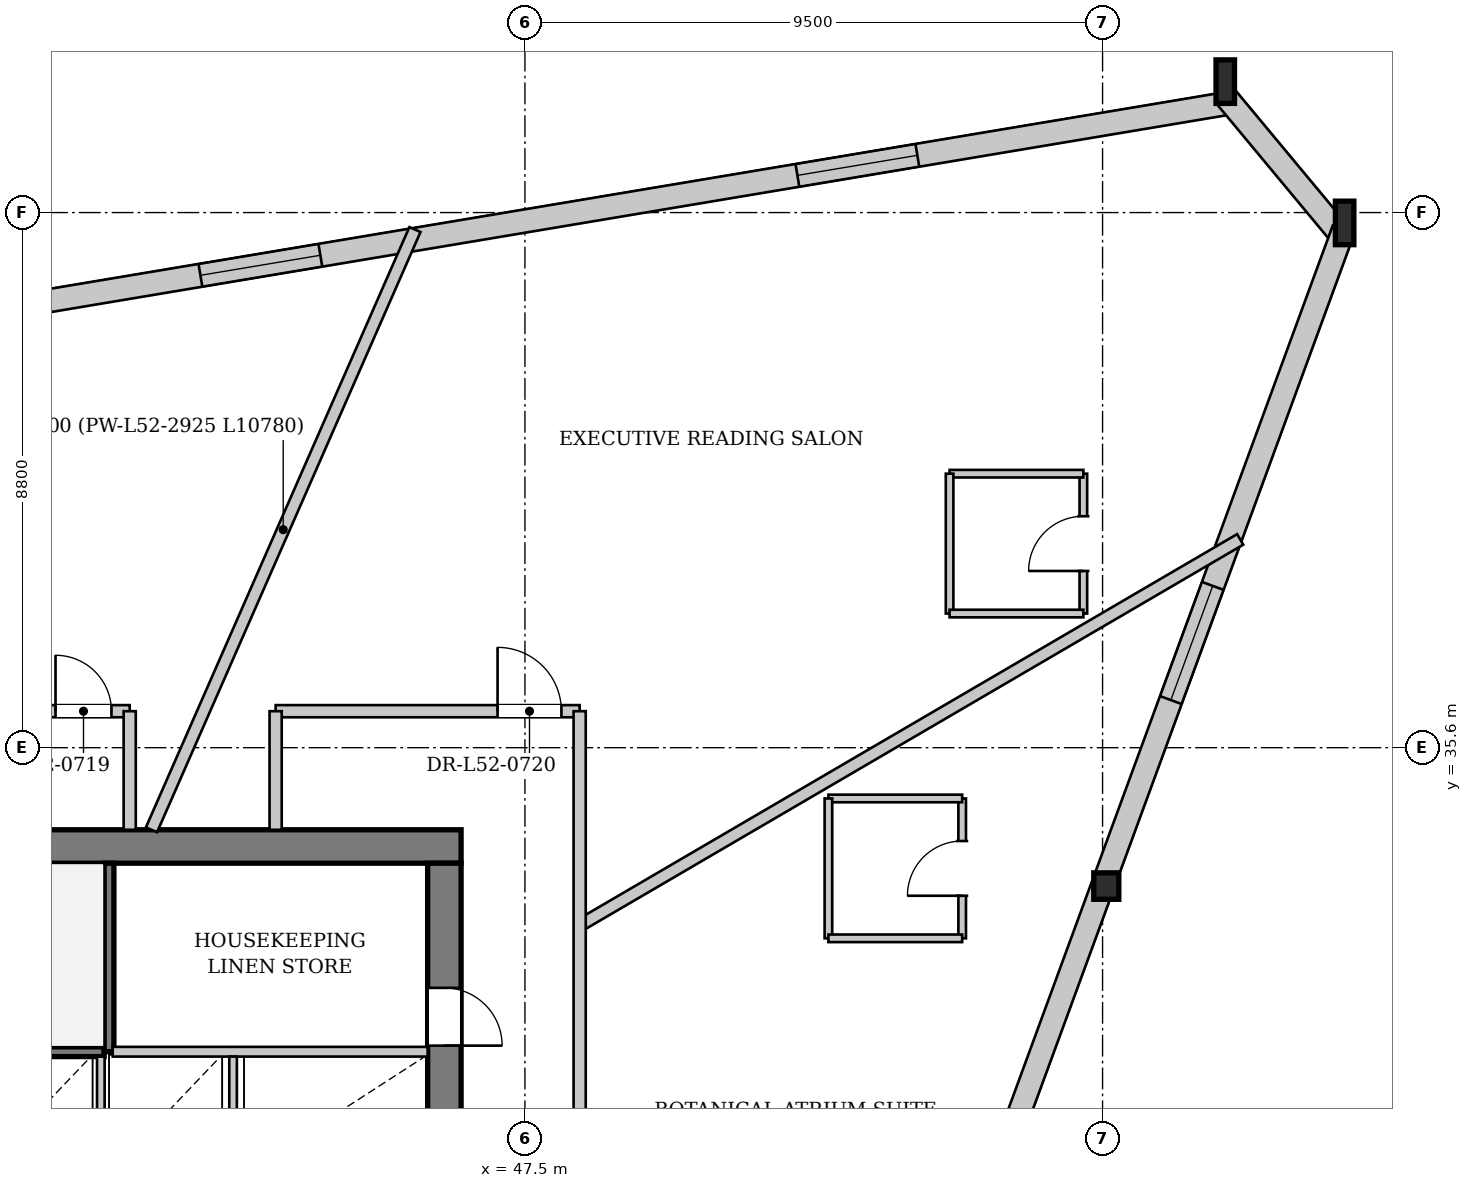
"""IFC4 building model, lengths in metres.
Left out: names, types, materials, properties, quantities, classifications, styles, units other than length and angle.
Written with IfcOpenShell. Run it as: python <this file> out.ifc"""

import sys

from ifc_helpers import new_model, si_unit, direction, frame, frame_2d, origin, origin_2d, place, context, subcontext, project, spatial, rectangle, i_section, extrude, source, transform, mapped, element, fill, save


model = new_model("IFC4")
c1 = context("Model", 3, precision=1e-05, world=origin(), true_north=direction((0.0, 1.0)))
c2 = subcontext(c1, "Body", "Model", "MODEL_VIEW")
j1 = project(units=[si_unit("LENGTHUNIT", "METRE"), si_unit("PLANEANGLEUNIT", "RADIAN")], contexts=[c1])
p1 = place(None, origin())
s1 = spatial("IfcSite", under=j1, at=p1, CompositionType="ELEMENT")
p2 = place(p1, origin())
s2 = spatial("IfcBuilding", under=s1, at=p2, CompositionType="ELEMENT")
p3 = place(p2, frame((0.0, 0.0, 196.3)))
s3 = spatial("IfcBuildingStorey", under=s2, at=p3, CompositionType="ELEMENT", Elevation=196.3)
m1 = source(origin(), c2, "Body", "SweptSolid", [
    extrude(i_section(OverallWidth=0.304, OverallDepth=0.716, WebThickness=0.021, FlangeThickness=0.04, at=origin_2d()), origin(), (0.0, 0.0, 1.0), 3.864),
])
p4 = place(p3, frame((61.142, 44.056, 0.0), z_axis=(-0.083525770677, 0.089780726273, 0.992452954463), x_axis=(-0.732150884226, -0.681142483425, 0.0)))
e1 = element("IfcColumn", 1, at=p4, inside=s3, PredefinedType="COLUMN", context=c2, shape_type="MappedRepresentation", body=[
    mapped(m1, transform((0.0, 0.0, 0.0), x_axis=(1.0, 0.0, 0.0), y_axis=(0.0, 1.0, 0.0), z_axis=(0.0, 0.0, 1.0), scale=1.0)),
])
m2 = source(origin(), c2, "Body", "SweptSolid", [
    extrude(i_section(OverallWidth=0.304, OverallDepth=0.716, WebThickness=0.021, FlangeThickness=0.04, at=origin_2d()), origin(), (0.0, 0.0, 1.0), 3.86),
])
p5 = place(p3, frame((59.185, 46.41, 0.0), z_axis=(-0.086647024818, 0.074250808128, 0.993468223237), x_axis=(-0.650700079032, -0.759334845208, 0.0)))
e2 = element("IfcColumn", 2, at=p5, inside=s3, PredefinedType="COLUMN", context=c2, shape_type="MappedRepresentation", body=[
    mapped(m2, transform((0.0, 0.0, 0.0), x_axis=(1.0, 0.0, 0.0), y_axis=(0.0, 1.0, 0.0), z_axis=(0.0, 0.0, 1.0), scale=1.0)),
])
m3 = source(origin(), c2, "Body", "SweptSolid", [
    extrude(i_section(OverallWidth=0.412, OverallDepth=0.435, WebThickness=0.031, FlangeThickness=0.05, at=origin_2d()), origin(), (0.0, 0.0, 1.0), 3.851),
])
p6 = place(p3, frame((57.146, 33.17, 0.0), z_axis=(-0.043744108522, 0.079880545996, 0.995844140085), x_axis=(-0.877096267842, -0.480314622866, 0.0)))
e3 = element("IfcColumn", 3, at=p6, inside=s3, PredefinedType="COLUMN", context=c2, shape_type="MappedRepresentation", body=[
    mapped(m3, transform((0.0, 0.0, 0.0), x_axis=(1.0, 0.0, 0.0), y_axis=(0.0, 1.0, 0.0), z_axis=(0.0, 0.0, 1.0), scale=1.0)),
])
p7 = place(p3, frame((36.9, 42.487, 0.0), z_axis=(0.0, 0.0, 1.0), x_axis=(0.986277614339, 0.165095328385, 0.0)))
e4 = element("IfcWall", 4, at=p7, inside=s3, PredefinedType="SOLIDWALL", context=c2, shape_type="SweptSolid", body=[
    extrude(rectangle(XDim=22.627, YDim=0.38, at=frame_2d((11.313, 0.0))), origin(), (0.0, 0.0, 1.0), 3.172),
])
p8 = place(p7, frame((5.336, 0.0, 0.252)))
e5 = element("IfcOpeningElement", 5, at=p8, cuts=e4, PredefinedType="OPENING", context=c2, shape_type="SweptSolid", body=[
    extrude(rectangle(XDim=2.0, YDim=2.8, at=frame_2d((1.0, 1.4))), frame((0.0, 0.2, 0.0), z_axis=(0.0, -1.0, 0.0), x_axis=(1.0, 0.0, 0.0)), (0.0, 0.0, 1.0), 0.4),
])
p9 = place(p7, frame((15.291, 0.0, 0.252)))
e6 = element("IfcOpeningElement", 6, at=p9, cuts=e4, PredefinedType="OPENING", context=c2, shape_type="SweptSolid", body=[
    extrude(rectangle(XDim=2.0, YDim=2.8, at=frame_2d((1.0, 1.4))), frame((0.0, 0.2, 0.0), z_axis=(0.0, -1.0, 0.0), x_axis=(1.0, 0.0, 0.0)), (0.0, 0.0, 1.0), 0.4),
])
p10 = place(p3, frame((59.039, 46.288, 0.0), z_axis=(0.0, 0.0, 1.0), x_axis=(0.639415269813, -0.76886156929, 0.0)))
e7 = element("IfcWall", 7, at=p10, inside=s3, PredefinedType="SOLIDWALL", context=c2, shape_type="SweptSolid", body=[
    extrude(rectangle(XDim=3.061, YDim=0.38, at=frame_2d((1.531, 0.0))), origin(), (0.0, 0.0, 1.0), 3.172),
])
p11 = place(p3, frame((60.964, 44.122, 0.0), z_axis=(0.0, 0.0, 1.0), x_axis=(-0.344663194366, -0.938726415123, 0.0)))
e8 = element("IfcWall", 8, at=p11, inside=s3, PredefinedType="SOLIDWALL", context=c2, shape_type="SweptSolid", body=[
    extrude(rectangle(XDim=23.193, YDim=0.38, at=frame_2d((11.597, 0.0))), origin(), (0.0, 0.0, 1.0), 3.172),
])
p12 = place(p11, frame((6.244, 0.0, 0.252)))
e9 = element("IfcOpeningElement", 9, at=p12, cuts=e8, PredefinedType="OPENING", context=c2, shape_type="SweptSolid", body=[
    extrude(rectangle(XDim=2.0, YDim=2.8, at=frame_2d((1.0, 1.4))), frame((0.0, 0.2, 0.0), z_axis=(0.0, -1.0, 0.0), x_axis=(1.0, 0.0, 0.0)), (0.0, 0.0, 1.0), 0.4),
])
p13 = place(p11, frame((15.699, 0.0, 0.252)))
e10 = element("IfcOpeningElement", 10, at=p13, cuts=e8, PredefinedType="OPENING", context=c2, shape_type="SweptSolid", body=[
    extrude(rectangle(XDim=2.0, YDim=2.8, at=frame_2d((1.0, 1.4))), frame((0.0, 0.2, 0.0), z_axis=(0.0, -1.0, 0.0), x_axis=(1.0, 0.0, 0.0)), (0.0, 0.0, 1.0), 0.4),
])
p14 = place(p3, frame((29.55, 33.975, 0.0), z_axis=(0.0, 0.0, 1.0), x_axis=(1.0, 0.0, 0.0)))
e11 = element("IfcWall", 11, at=p14, inside=s3, PredefinedType="SHEAR", context=c2, shape_type="SweptSolid", body=[
    extrude(rectangle(XDim=16.9, YDim=0.55, at=frame_2d((8.45, 0.0))), origin(), (0.0, 0.0, 1.0), 3.78),
])
p15 = place(p14, frame((1.55, 0.0, 0.0)))
e12 = element("IfcOpeningElement", 12, at=p15, cuts=e11, PredefinedType="OPENING", context=c2, shape_type="SweptSolid", body=[
    extrude(rectangle(XDim=0.95, YDim=2.1, at=frame_2d((0.475, 1.05))), frame((0.0, 0.285, 0.0), z_axis=(0.0, -1.0, 0.0), x_axis=(1.0, 0.0, 0.0)), (0.0, 0.0, 1.0), 0.57),
])
p16 = place(p14, frame((3.93, 0.0, 0.0)))
e13 = element("IfcOpeningElement", 13, at=p16, cuts=e11, PredefinedType="OPENING", context=c2, shape_type="SweptSolid", body=[
    extrude(rectangle(XDim=1.32, YDim=2.2, at=frame_2d((0.66, 1.1))), frame((0.0, 0.285, 0.0), z_axis=(0.0, -1.0, 0.0), x_axis=(1.0, 0.0, 0.0)), (0.0, 0.0, 1.0), 0.57),
])
p17 = place(p3, frame((46.175, 33.7, 0.0), z_axis=(0.0, 0.0, 1.0), x_axis=(0.0, -1.0, 0.0)))
e14 = element("IfcWall", 14, at=p17, inside=s3, PredefinedType="SHEAR", context=c2, shape_type="SweptSolid", body=[
    extrude(rectangle(XDim=14.2, YDim=0.55, at=frame_2d((7.1, 0.0))), origin(), (0.0, 0.0, 1.0), 3.78),
])
p18 = place(p17, frame((5.18, 0.0, 0.0)))
e15 = element("IfcOpeningElement", 15, at=p18, cuts=e14, PredefinedType="OPENING", context=c2, shape_type="SweptSolid", body=[
    extrude(rectangle(XDim=1.6, YDim=2.2, at=frame_2d((0.8, 1.1))), frame((0.0, 0.285, 0.0), z_axis=(0.0, -1.0, 0.0), x_axis=(1.0, 0.0, 0.0)), (0.0, 0.0, 1.0), 0.57),
])
p19 = place(p17, frame((2.05, 0.0, 0.0)))
e16 = element("IfcOpeningElement", 16, at=p19, cuts=e14, PredefinedType="OPENING", context=c2, shape_type="SweptSolid", body=[
    extrude(rectangle(XDim=0.95, YDim=2.1, at=frame_2d((0.475, 1.05))), frame((0.0, 0.285, 0.0), z_axis=(0.0, -1.0, 0.0), x_axis=(1.0, 0.0, 0.0)), (0.0, 0.0, 1.0), 0.57),
])
p20 = place(p3, frame((33.28, 30.6, 0.0), z_axis=(0.0, 0.0, 1.0), x_axis=(1.0, 0.0, 0.0)))
e17 = element("IfcWall", 17, at=p20, inside=s3, PredefinedType="PARTITIONING", context=c2, shape_type="SweptSolid", body=[
    extrude(rectangle(XDim=7.3, YDim=0.16, at=frame_2d((3.65, 0.0))), origin(), (0.0, 0.0, 1.0), 3.78),
])
p21 = place(p3, frame((40.66, 30.6, 0.0), z_axis=(0.0, 0.0, 1.0), x_axis=(0.0, 1.0, 0.0)))
e18 = element("IfcWall", 18, at=p21, inside=s3, PredefinedType="PARTITIONING", context=c2, shape_type="SweptSolid", body=[
    extrude(rectangle(XDim=3.1, YDim=0.16, at=frame_2d((1.55, 0.0))), origin(), (0.0, 0.0, 1.0), 3.78),
])
p22 = place(p3, frame((40.72, 30.6, 0.0), z_axis=(0.0, 0.0, 1.0), x_axis=(1.0, 0.0, 0.0)))
e19 = element("IfcWall", 19, at=p22, inside=s3, PredefinedType="PARTITIONING", context=c2, shape_type="SweptSolid", body=[
    extrude(rectangle(XDim=5.18, YDim=0.16, at=frame_2d((2.59, 0.0))), origin(), (0.0, 0.0, 1.0), 3.78),
])
for number, where, z_axis, x_axis in (
    (20, (40.525, 28.6, 0.0), (0.0, 0.0, 1.0), (0.0, 1.0, 0.0)),
    (21, (42.7, 28.6, 0.0), (0.0, 0.0, 1.0), (0.0, 1.0, 0.0)),
):
    element("IfcWall", number, at=place(p3, frame(where, z_axis=z_axis, x_axis=x_axis)), inside=s3, PredefinedType="PARTITIONING", context=c2, shape_type="SweptSolid", body=[
        extrude(rectangle(XDim=1.92, YDim=0.125, at=frame_2d((0.96, 0.0))), origin(), (0.0, 0.0, 1.0), 3.78),
    ])
p23 = place(p3, frame((41.358, 34.25, 0.0), z_axis=(0.0, 0.0, 1.0), x_axis=(0.401937727642, 0.915667004483, 0.0)))
e22 = element("IfcWall", 22, at=p23, inside=s3, PredefinedType="PARTITIONING", context=c2, shape_type="SweptSolid", body=[
    extrude(rectangle(XDim=10.78, YDim=0.2, at=frame_2d((5.39, 0.0))), origin(), (0.0, 0.0, 1.0), 3.78),
])
p24 = place(p3, frame((48.4, 32.677, 0.0), z_axis=(0.0, 0.0, 1.0), x_axis=(0.863398619096, 0.504522372688, 0.0)))
e23 = element("IfcWall", 23, at=p24, inside=s3, PredefinedType="PARTITIONING", context=c2, shape_type="SweptSolid", body=[
    extrude(rectangle(XDim=12.582, YDim=0.2, at=frame_2d((6.291, 0.0))), origin(), (0.0, 0.0, 1.0), 3.78),
])
p25 = place(p3, frame((54.691, 32.465, 0.0), z_axis=(0.0, 0.0, 1.0), x_axis=(0.0, 1.0, 0.0)))
e24 = element("IfcWall", 24, at=p25, inside=s3, PredefinedType="PARTITIONING", context=c2, shape_type="SweptSolid", body=[
    extrude(rectangle(XDim=2.3, YDim=0.125, at=frame_2d((1.15, 0.0))), origin(), (0.0, 0.0, 1.0), 3.78),
])
p26 = place(p25, frame((0.7, 0.0, 0.0)))
e25 = element("IfcOpeningElement", 25, at=p26, cuts=e24, PredefinedType="OPENING", context=c2, shape_type="SweptSolid", body=[
    extrude(rectangle(XDim=0.9, YDim=2.1, at=frame_2d((0.45, 1.05))), frame((0.0, 0.073, 0.0), z_axis=(0.0, -1.0, 0.0), x_axis=(1.0, 0.0, 0.0)), (0.0, 0.0, 1.0), 0.145),
])
p27 = place(p3, frame((54.691, 34.765, 0.0), z_axis=(0.0, 0.0, 1.0), x_axis=(-1.0, 0.0, 0.0)))
e26 = element("IfcWall", 26, at=p27, inside=s3, PredefinedType="PARTITIONING", context=c2, shape_type="SweptSolid", body=[
    extrude(rectangle(XDim=2.2, YDim=0.125, at=frame_2d((1.1, 0.0))), origin(), (0.0, 0.0, 1.0), 3.78),
])
p28 = place(p3, frame((52.491, 34.765, 0.0), z_axis=(0.0, 0.0, 1.0), x_axis=(0.0, -1.0, 0.0)))
e27 = element("IfcWall", 27, at=p28, inside=s3, PredefinedType="PARTITIONING", context=c2, shape_type="SweptSolid", body=[
    extrude(rectangle(XDim=2.3, YDim=0.125, at=frame_2d((1.15, 0.0))), origin(), (0.0, 0.0, 1.0), 3.78),
])
p29 = place(p3, frame((52.491, 32.465, 0.0), z_axis=(0.0, 0.0, 1.0), x_axis=(1.0, 0.0, 0.0)))
e28 = element("IfcWall", 28, at=p29, inside=s3, PredefinedType="PARTITIONING", context=c2, shape_type="SweptSolid", body=[
    extrude(rectangle(XDim=2.2, YDim=0.125, at=frame_2d((1.1, 0.0))), origin(), (0.0, 0.0, 1.0), 3.78),
])
p30 = place(p3, frame((56.684, 37.806, 0.0), z_axis=(0.0, 0.0, 1.0), x_axis=(0.0, 1.0, 0.0)))
e29 = element("IfcWall", 29, at=p30, inside=s3, PredefinedType="PARTITIONING", context=c2, shape_type="SweptSolid", body=[
    extrude(rectangle(XDim=2.3, YDim=0.125, at=frame_2d((1.15, 0.0))), origin(), (0.0, 0.0, 1.0), 3.78),
])
p31 = place(p30, frame((0.7, 0.0, 0.0)))
e30 = element("IfcOpeningElement", 30, at=p31, cuts=e29, PredefinedType="OPENING", context=c2, shape_type="SweptSolid", body=[
    extrude(rectangle(XDim=0.9, YDim=2.1, at=frame_2d((0.45, 1.05))), frame((0.0, 0.073, 0.0), z_axis=(0.0, -1.0, 0.0), x_axis=(1.0, 0.0, 0.0)), (0.0, 0.0, 1.0), 0.145),
])
p32 = place(p3, frame((56.684, 40.106, 0.0), z_axis=(0.0, 0.0, 1.0), x_axis=(-1.0, 0.0, 0.0)))
e31 = element("IfcWall", 31, at=p32, inside=s3, PredefinedType="PARTITIONING", context=c2, shape_type="SweptSolid", body=[
    extrude(rectangle(XDim=2.2, YDim=0.125, at=frame_2d((1.1, 0.0))), origin(), (0.0, 0.0, 1.0), 3.78),
])
p33 = place(p3, frame((54.484, 40.106, 0.0), z_axis=(0.0, 0.0, 1.0), x_axis=(0.0, -1.0, 0.0)))
e32 = element("IfcWall", 32, at=p33, inside=s3, PredefinedType="PARTITIONING", context=c2, shape_type="SweptSolid", body=[
    extrude(rectangle(XDim=2.3, YDim=0.125, at=frame_2d((1.15, 0.0))), origin(), (0.0, 0.0, 1.0), 3.78),
])
p34 = place(p3, frame((54.484, 37.806, 0.0), z_axis=(0.0, 0.0, 1.0), x_axis=(1.0, 0.0, 0.0)))
e33 = element("IfcWall", 33, at=p34, inside=s3, PredefinedType="PARTITIONING", context=c2, shape_type="SweptSolid", body=[
    extrude(rectangle(XDim=2.2, YDim=0.125, at=frame_2d((1.1, 0.0))), origin(), (0.0, 0.0, 1.0), 3.78),
])
p35 = place(p3, frame((38.65, 36.2, 0.0), z_axis=(0.0, 0.0, 1.0), x_axis=(1.0, 0.0, 0.0)))
e34 = element("IfcWall", 34, at=p35, inside=s3, PredefinedType="PARTITIONING", context=c2, shape_type="SweptSolid", body=[
    extrude(rectangle(XDim=2.35, YDim=0.2, at=frame_2d((1.175, 0.0))), origin(), (0.0, 0.0, 1.0), 3.78),
])
p36 = place(p35, frame((1.13, 0.0, 0.0)))
e35 = element("IfcOpeningElement", 35, at=p36, cuts=e34, PredefinedType="OPENING", context=c2, shape_type="SweptSolid", body=[
    extrude(rectangle(XDim=0.92, YDim=2.1, at=frame_2d((0.46, 1.05))), frame((0.0, 0.11, 0.0), z_axis=(0.0, -1.0, 0.0), x_axis=(1.0, 0.0, 0.0)), (0.0, 0.0, 1.0), 0.22),
])
p37 = place(p3, frame((41.0, 34.25, 0.0), z_axis=(0.0, 0.0, 1.0), x_axis=(0.0, 1.0, 0.0)))
e36 = element("IfcWall", 36, at=p37, inside=s3, PredefinedType="PARTITIONING", context=c2, shape_type="SweptSolid", body=[
    extrude(rectangle(XDim=1.95, YDim=0.2, at=frame_2d((0.975, 0.0))), origin(), (0.0, 0.0, 1.0), 3.78),
])
p38 = place(p3, frame((43.4, 36.2, 0.0), z_axis=(0.0, 0.0, 1.0), x_axis=(1.0, 0.0, 0.0)))
e37 = element("IfcWall", 37, at=p38, inside=s3, PredefinedType="PARTITIONING", context=c2, shape_type="SweptSolid", body=[
    extrude(rectangle(XDim=5.0, YDim=0.2, at=frame_2d((2.5, 0.0))), origin(), (0.0, 0.0, 1.0), 3.78),
])
p39 = place(p38, frame((3.65, 0.0, 0.0)))
e38 = element("IfcOpeningElement", 38, at=p39, cuts=e37, PredefinedType="OPENING", context=c2, shape_type="SweptSolid", body=[
    extrude(rectangle(XDim=1.05, YDim=2.2, at=frame_2d((0.525, 1.1))), frame((0.0, 0.11, 0.0), z_axis=(0.0, -1.0, 0.0), x_axis=(1.0, 0.0, 0.0)), (0.0, 0.0, 1.0), 0.22),
])
p40 = place(p3, frame((43.4, 34.25, 0.0), z_axis=(0.0, 0.0, 1.0), x_axis=(0.0, 1.0, 0.0)))
e39 = element("IfcWall", 39, at=p40, inside=s3, PredefinedType="PARTITIONING", context=c2, shape_type="SweptSolid", body=[
    extrude(rectangle(XDim=1.95, YDim=0.2, at=frame_2d((0.975, 0.0))), origin(), (0.0, 0.0, 1.0), 3.78),
])
p41 = place(p3, frame((48.4, 17.0, 0.0), z_axis=(0.0, 0.0, 1.0), x_axis=(0.0, 1.0, 0.0)))
e40 = element("IfcWall", 40, at=p41, inside=s3, PredefinedType="PARTITIONING", context=c2, shape_type="SweptSolid", body=[
    extrude(rectangle(XDim=19.2, YDim=0.2, at=frame_2d((9.6, 0.0))), origin(), (0.0, 0.0, 1.0), 3.78),
])
p42 = place(p41, frame((10.688, 0.0, 0.0)))
e41 = element("IfcOpeningElement", 41, at=p42, cuts=e40, PredefinedType="OPENING", context=c2, shape_type="SweptSolid", body=[
    extrude(rectangle(XDim=1.05, YDim=2.2, at=frame_2d((0.525, 1.1))), frame((0.0, 0.11, 0.0), z_axis=(0.0, -1.0, 0.0), x_axis=(1.0, 0.0, 0.0)), (0.0, 0.0, 1.0), 0.22),
])
m4 = source(origin(), c2, "Body", "SweptSolid", [
    extrude(rectangle(XDim=2.0, YDim=2.8, at=frame_2d((1.0, 1.4))), frame((0.0, 0.03, 0.0), z_axis=(0.0, -1.0, 0.0), x_axis=(1.0, 0.0, 0.0)), (0.0, 0.0, 1.0), 0.06),
])
p43 = place(p8, origin())
e42 = element("IfcWindow", 42, at=p43, inside=s3, PartitioningType="SINGLE_PANEL", PredefinedType="WINDOW", context=c2, shape_type="MappedRepresentation", body=[
    mapped(m4, transform((0.0, 0.0, 0.0), x_axis=(1.0, 0.0, 0.0), y_axis=(0.0, 1.0, 0.0), z_axis=(0.0, 0.0, 1.0), scale=1.0)),
])
fill(e5, e42)
p44 = place(p9, origin())
e43 = element("IfcWindow", 43, at=p44, inside=s3, PartitioningType="SINGLE_PANEL", PredefinedType="WINDOW", context=c2, shape_type="MappedRepresentation", body=[
    mapped(m4, transform((0.0, 0.0, 0.0), x_axis=(1.0, 0.0, 0.0), y_axis=(0.0, 1.0, 0.0), z_axis=(0.0, 0.0, 1.0), scale=1.0)),
])
fill(e6, e43)
p45 = place(p12, origin())
e44 = element("IfcWindow", 44, at=p45, inside=s3, PartitioningType="SINGLE_PANEL", PredefinedType="WINDOW", context=c2, shape_type="MappedRepresentation", body=[
    mapped(m4, transform((0.0, 0.0, 0.0), x_axis=(1.0, 0.0, 0.0), y_axis=(0.0, 1.0, 0.0), z_axis=(0.0, 0.0, 1.0), scale=1.0)),
])
fill(e9, e44)
m5 = source(origin(), c2, "Body", "SweptSolid", [
    extrude(rectangle(XDim=0.95, YDim=2.1, at=frame_2d((0.475, 1.05))), frame((0.0, 0.025, 0.0), z_axis=(0.0, -1.0, 0.0), x_axis=(1.0, 0.0, 0.0)), (0.0, 0.0, 1.0), 0.05),
])
p46 = place(p19, origin())
e45 = element("IfcDoor", 45, at=p46, inside=s3, OperationType="SINGLE_SWING_RIGHT", PredefinedType="DOOR", context=c2, shape_type="MappedRepresentation", body=[
    mapped(m5, transform((0.0, 0.0, 0.0), x_axis=(1.0, 0.0, 0.0), y_axis=(0.0, 1.0, 0.0), z_axis=(0.0, 0.0, 1.0), scale=1.0)),
])
fill(e16, e45)
m6 = source(origin(), c2, "Body", "SweptSolid", [
    extrude(rectangle(XDim=0.9, YDim=2.1, at=frame_2d((0.45, 1.05))), frame((0.0, 0.025, 0.0), z_axis=(0.0, -1.0, 0.0), x_axis=(1.0, 0.0, 0.0)), (0.0, 0.0, 1.0), 0.05),
])
p47 = place(p26, origin())
e46 = element("IfcDoor", 46, at=p47, inside=s3, OperationType="SINGLE_SWING_LEFT", PredefinedType="DOOR", context=c2, shape_type="MappedRepresentation", body=[
    mapped(m6, transform((0.0, 0.0, 0.0), x_axis=(1.0, 0.0, 0.0), y_axis=(0.0, 1.0, 0.0), z_axis=(0.0, 0.0, 1.0), scale=1.0)),
])
fill(e25, e46)
p48 = place(p31, origin())
e47 = element("IfcDoor", 47, at=p48, inside=s3, OperationType="SINGLE_SWING_LEFT", PredefinedType="DOOR", context=c2, shape_type="MappedRepresentation", body=[
    mapped(m6, transform((0.0, 0.0, 0.0), x_axis=(1.0, 0.0, 0.0), y_axis=(0.0, 1.0, 0.0), z_axis=(0.0, 0.0, 1.0), scale=1.0)),
])
fill(e30, e47)
m7 = source(origin(), c2, "Body", "SweptSolid", [
    extrude(rectangle(XDim=0.92, YDim=2.1, at=frame_2d((0.46, 1.05))), frame((0.0, 0.025, 0.0), z_axis=(0.0, -1.0, 0.0), x_axis=(1.0, 0.0, 0.0)), (0.0, 0.0, 1.0), 0.05),
])
p49 = place(p36, origin())
e48 = element("IfcDoor", 48, at=p49, inside=s3, OperationType="SINGLE_SWING_LEFT", PredefinedType="DOOR", context=c2, shape_type="MappedRepresentation", body=[
    mapped(m7, transform((0.0, 0.0, 0.0), x_axis=(1.0, 0.0, 0.0), y_axis=(0.0, 1.0, 0.0), z_axis=(0.0, 0.0, 1.0), scale=1.0)),
])
fill(e35, e48)
m8 = source(origin(), c2, "Body", "SweptSolid", [
    extrude(rectangle(XDim=1.05, YDim=2.2, at=frame_2d((0.525, 1.1))), frame((0.0, 0.025, 0.0), z_axis=(0.0, -1.0, 0.0), x_axis=(1.0, 0.0, 0.0)), (0.0, 0.0, 1.0), 0.05),
])
p50 = place(p39, origin())
e49 = element("IfcDoor", 49, at=p50, inside=s3, OperationType="SINGLE_SWING_LEFT", PredefinedType="DOOR", context=c2, shape_type="MappedRepresentation", body=[
    mapped(m8, transform((0.0, 0.0, 0.0), x_axis=(1.0, 0.0, 0.0), y_axis=(0.0, 1.0, 0.0), z_axis=(0.0, 0.0, 1.0), scale=1.0)),
])
fill(e38, e49)
save(model, sys.argv[1])
